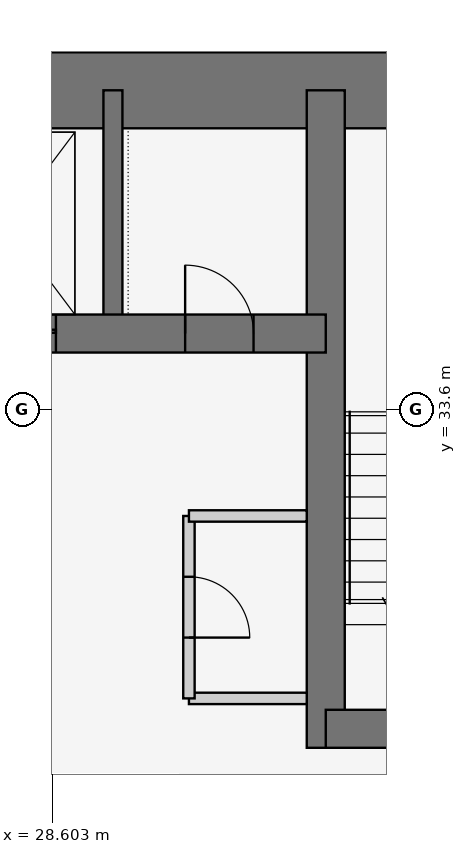
"""IFC4 building model, lengths in metres.
Left out: names, types, materials, properties, quantities, classifications, styles, units other than length and angle.
Written with IfcOpenShell. Run it as: python <this file> out.ifc"""

import sys

from ifc_helpers import new_model, si_unit, direction, frame, frame_2d, origin, place, context, subcontext, project, spatial, rectangle, extrude, element, fill, save


model = new_model("IFC4")
c1 = context("Model", 3, precision=1e-05, world=origin(), true_north=direction((0.0, 1.0)))
c2 = subcontext(c1, "Body", "Model", "MODEL_VIEW")
j1 = project(units=[si_unit("LENGTHUNIT", "METRE"), si_unit("PLANEANGLEUNIT", "RADIAN")], contexts=[c1])
p1 = place(None, origin())
s1 = spatial("IfcSite", under=j1, at=p1, CompositionType="ELEMENT")
p2 = place(p1, origin())
s2 = spatial("IfcBuilding", under=s1, at=p2, CompositionType="ELEMENT")
p3 = place(p2, frame((0.0, 0.0, 95.7)))
s3 = spatial("IfcBuildingStorey", under=s2, at=p3, CompositionType="ELEMENT", Elevation=95.7)
p4 = place(p3, frame((37.8, 37.8, 0.0), z_axis=(0.0, 0.0, 1.0), x_axis=(-1.0, 0.0, 0.0)))
e1 = element("IfcWall", 1, at=p4, inside=s3, PredefinedType="SHEAR", context=c2, shape_type="SweptSolid", body=[
    extrude(rectangle(XDim=17.3, YDim=1.0, at=frame_2d((8.65, 0.0))), origin(), (0.0, 0.0, 1.0), 3.6),
])
p5 = place(p3, frame((21.0, 34.6, 0.0), z_axis=(0.0, 0.0, 1.0), x_axis=(1.0, 0.0, 0.0)))
e2 = element("IfcWall", 2, at=p5, inside=s3, PredefinedType="SHEAR", context=c2, shape_type="SweptSolid", body=[
    extrude(rectangle(XDim=11.2, YDim=0.5, at=frame_2d((5.6, 0.0))), origin(), (0.0, 0.0, 1.0), 3.6),
])
p6 = place(p5, frame((9.35, 0.0, 0.0)))
e3 = element("IfcOpeningElement", 3, at=p6, cuts=e2, PredefinedType="OPENING", context=c2, shape_type="SweptSolid", body=[
    extrude(rectangle(XDim=0.9, YDim=2.1, at=frame_2d((0.45, 1.05))), frame((0.0, 0.26, 0.0), z_axis=(0.0, -1.0, 0.0), x_axis=(1.0, 0.0, 0.0)), (0.0, 0.0, 1.0), 0.52),
])
p7 = place(p5, frame((1.0, 0.0, 0.0)))
e4 = element("IfcOpeningElement", 4, at=p7, cuts=e2, PredefinedType="OPENING", context=c2, shape_type="SweptSolid", body=[
    extrude(rectangle(XDim=1.1, YDim=2.1, at=frame_2d((0.55, 1.05))), frame((0.0, 0.26, 0.0), z_axis=(0.0, -1.0, 0.0), x_axis=(1.0, 0.0, 0.0)), (0.0, 0.0, 1.0), 0.52),
])
p8 = place(p5, frame((3.65, 0.0, 0.0)))
e5 = element("IfcOpeningElement", 5, at=p8, cuts=e2, PredefinedType="OPENING", context=c2, shape_type="SweptSolid", body=[
    extrude(rectangle(XDim=1.1, YDim=2.1, at=frame_2d((0.55, 1.05))), frame((0.0, 0.26, 0.0), z_axis=(0.0, -1.0, 0.0), x_axis=(1.0, 0.0, 0.0)), (0.0, 0.0, 1.0), 0.52),
])
p9 = place(p5, frame((6.35, 0.0, 0.0)))
e6 = element("IfcOpeningElement", 6, at=p9, cuts=e2, PredefinedType="OPENING", context=c2, shape_type="SweptSolid", body=[
    extrude(rectangle(XDim=1.3, YDim=2.1, at=frame_2d((0.65, 1.05))), frame((0.0, 0.26, 0.0), z_axis=(0.0, -1.0, 0.0), x_axis=(1.0, 0.0, 0.0)), (0.0, 0.0, 1.0), 0.52),
])
p10 = place(p3, frame((32.2, 29.15, 0.0), z_axis=(0.0, 0.0, 1.0), x_axis=(0.0, 1.0, 0.0)))
e7 = element("IfcWall", 7, at=p10, inside=s3, PredefinedType="SHEAR", context=c2, shape_type="SweptSolid", body=[
    extrude(rectangle(XDim=8.65, YDim=0.5, at=frame_2d((4.325, 0.0))), origin(), (0.0, 0.0, 1.0), 3.6),
])
p11 = place(p3, frame((32.2, 29.4, 0.0), z_axis=(0.0, 0.0, 1.0), x_axis=(1.0, 0.0, 0.0)))
e8 = element("IfcWall", 8, at=p11, inside=s3, PredefinedType="SHEAR", context=c2, shape_type="SweptSolid", body=[
    extrude(rectangle(XDim=5.6, YDim=0.5, at=frame_2d((2.8, 0.0))), origin(), (0.0, 0.0, 1.0), 3.6),
])
p12 = place(p11, frame((2.0, 0.0, 0.0)))
e9 = element("IfcOpeningElement", 9, at=p12, cuts=e8, PredefinedType="OPENING", context=c2, shape_type="SweptSolid", body=[
    extrude(rectangle(XDim=1.2, YDim=2.1, at=frame_2d((0.6, 1.05))), frame((0.0, 0.26, 0.0), z_axis=(0.0, -1.0, 0.0), x_axis=(1.0, 0.0, 0.0)), (0.0, 0.0, 1.0), 0.52),
])
p13 = place(p3, frame((29.4, 34.6, 0.0), z_axis=(0.0, 0.0, 1.0), x_axis=(0.0, 1.0, 0.0)))
e10 = element("IfcWall", 10, at=p13, inside=s3, PredefinedType="SHEAR", context=c2, shape_type="SweptSolid", body=[
    extrude(rectangle(XDim=3.2, YDim=0.25, at=frame_2d((1.6, 0.0))), origin(), (0.0, 0.0, 1.0), 3.6),
])
p14 = place(p3, frame((31.95, 29.8, 0.0), z_axis=(0.0, 0.0, 1.0), x_axis=(-1.0, 0.0, 0.0)))
e11 = element("IfcWall", 11, at=p14, inside=s3, PredefinedType="PARTITIONING", context=c2, shape_type="SweptSolid", body=[
    extrude(rectangle(XDim=1.55, YDim=0.15, at=frame_2d((0.775, 0.0))), origin(), (0.0, 0.0, 1.0), 3.45),
])
p15 = place(p3, frame((30.4, 29.8, 0.0), z_axis=(0.0, 0.0, 1.0), x_axis=(0.0, 1.0, 0.0)))
e12 = element("IfcWall", 12, at=p15, inside=s3, PredefinedType="PARTITIONING", context=c2, shape_type="SweptSolid", body=[
    extrude(rectangle(XDim=2.4, YDim=0.15, at=frame_2d((1.2, 0.0))), origin(), (0.0, 0.0, 1.0), 3.45),
])
p16 = place(p15, frame((0.8, 0.0, 0.0)))
e13 = element("IfcOpeningElement", 13, at=p16, cuts=e12, PredefinedType="OPENING", context=c2, shape_type="SweptSolid", body=[
    extrude(rectangle(XDim=0.8, YDim=2.1, at=frame_2d((0.4, 1.05))), frame((0.0, 0.085, 0.0), z_axis=(0.0, -1.0, 0.0), x_axis=(1.0, 0.0, 0.0)), (0.0, 0.0, 1.0), 0.17),
])
p17 = place(p3, frame((30.4, 32.2, 0.0), z_axis=(0.0, 0.0, 1.0), x_axis=(1.0, 0.0, 0.0)))
e14 = element("IfcWall", 14, at=p17, inside=s3, PredefinedType="PARTITIONING", context=c2, shape_type="SweptSolid", body=[
    extrude(rectangle(XDim=1.55, YDim=0.15, at=frame_2d((0.775, 0.0))), origin(), (0.0, 0.0, 1.0), 3.45),
])
p18 = place(p6, origin())
e15 = element("IfcDoor", 15, at=p18, inside=s3, OperationType="SINGLE_SWING_LEFT", PredefinedType="DOOR", context=c2, shape_type="SweptSolid", body=[
    extrude(rectangle(XDim=0.9, YDim=2.1, at=frame_2d((0.45, 1.05))), frame((0.0, 0.025, 0.0), z_axis=(0.0, -1.0, 0.0), x_axis=(1.0, 0.0, 0.0)), (0.0, 0.0, 1.0), 0.05),
])
fill(e3, e15)
p19 = place(p16, frame((0.8, 0.0, 0.0), z_axis=(0.0, 0.0, 1.0), x_axis=(-1.0, 0.0, 0.0)))
e16 = element("IfcDoor", 16, at=p19, inside=s3, OperationType="SINGLE_SWING_RIGHT", PredefinedType="DOOR", context=c2, shape_type="SweptSolid", body=[
    extrude(rectangle(XDim=0.8, YDim=2.1, at=frame_2d((0.4, 1.05))), frame((0.0, 0.025, 0.0), z_axis=(0.0, -1.0, 0.0), x_axis=(1.0, 0.0, 0.0)), (0.0, 0.0, 1.0), 0.05),
])
fill(e13, e16)
p20 = place(p9, origin())
e17 = element("IfcDoor", 17, at=p20, inside=s3, OperationType="DOUBLE_DOOR_SLIDING", PredefinedType="DOOR", context=c2, shape_type="SweptSolid", body=[
    extrude(rectangle(XDim=1.3, YDim=2.1, at=frame_2d((0.65, 1.05))), frame((0.0, 0.025, 0.0), z_axis=(0.0, -1.0, 0.0), x_axis=(1.0, 0.0, 0.0)), (0.0, 0.0, 1.0), 0.05),
])
fill(e6, e17)
save(model, sys.argv[1])
